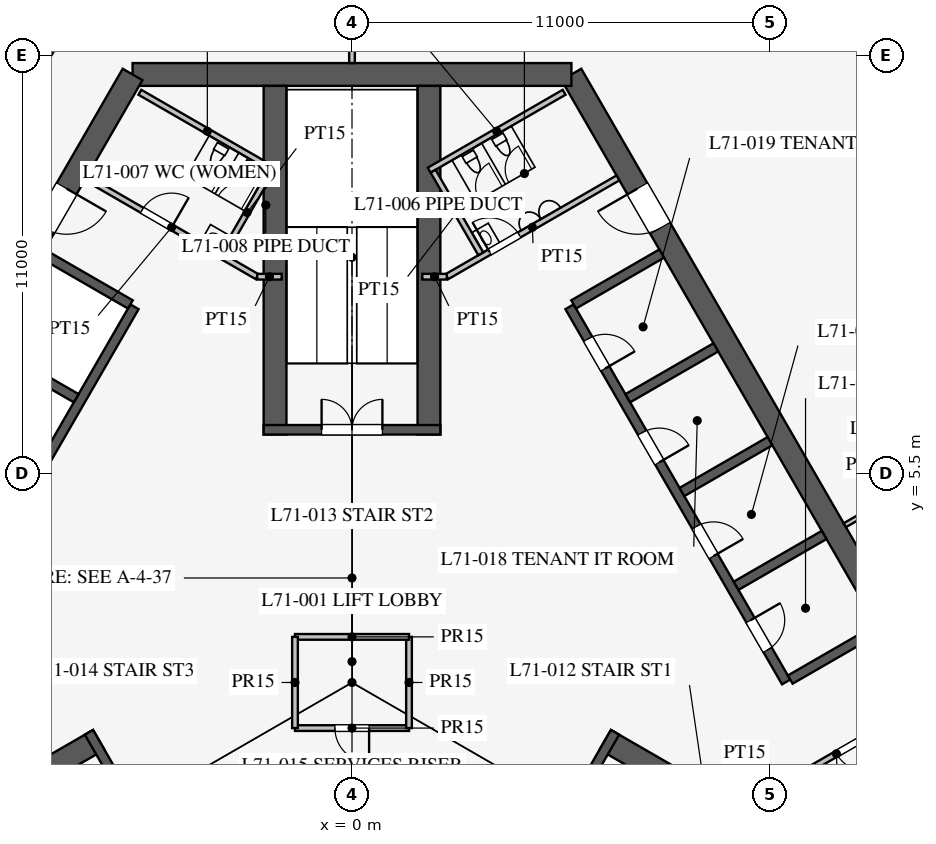
"""IFC4 building model, lengths in metres.
Left out: names, types, materials, properties, quantities, classifications, styles, units other than length and angle.
Written with IfcOpenShell. Run it as: python <this file> out.ifc"""

import sys

from ifc_helpers import new_model, si_unit, direction, frame, frame_2d, origin, place, context, subcontext, project, spatial, rectangle, extrude, element, fill, save


model = new_model("IFC4")
c1 = context("Model", 3, precision=1e-05, world=origin(), true_north=direction((0.0, 1.0)))
c2 = subcontext(c1, "Body", "Model", "MODEL_VIEW")
j1 = project(units=[si_unit("LENGTHUNIT", "METRE"), si_unit("PLANEANGLEUNIT", "RADIAN")], contexts=[c1])
p1 = place(None, origin())
s1 = spatial("IfcSite", under=j1, at=p1, CompositionType="ELEMENT")
p2 = place(p1, origin())
s2 = spatial("IfcBuilding", under=s1, at=p2, CompositionType="ELEMENT")
p3 = place(p2, frame((0.0, 0.0, 309.9)))
s3 = spatial("IfcBuildingStorey", under=s2, at=p3, CompositionType="ELEMENT", Elevation=309.9)
p4 = place(p3, frame((16.743, -3.0, 0.0), z_axis=(0.0, 0.0, 1.0), x_axis=(-0.500002442456, 0.866023993627, 0.0)))
e1 = element("IfcWall", 1, at=p4, inside=s3, PredefinedType="SHEAR", context=c2, shape_type="SweptSolid", body=[
    extrude(rectangle(XDim=21.939, YDim=0.6, at=frame_2d((10.97, 0.0))), origin(), (0.0, 0.0, 1.0), 4.2),
])
p5 = place(p4, frame((17.27, 0.0, 0.0)))
e2 = element("IfcOpeningElement", 2, at=p5, cuts=e1, PredefinedType="OPENING", context=c2, shape_type="SweptSolid", body=[
    extrude(rectangle(XDim=1.2, YDim=2.1, at=frame_2d((0.6, 1.05))), frame((0.0, 0.31, 0.0), z_axis=(0.0, -1.0, 0.0), x_axis=(1.0, 0.0, 0.0)), (0.0, 0.0, 1.0), 0.62),
])
p6 = place(p4, frame((3.47, 0.0, 0.0)))
e3 = element("IfcOpeningElement", 3, at=p6, cuts=e1, PredefinedType="OPENING", context=c2, shape_type="SweptSolid", body=[
    extrude(rectangle(XDim=1.2, YDim=2.1, at=frame_2d((0.6, 1.05))), frame((0.0, 0.31, 0.0), z_axis=(0.0, -1.0, 0.0), x_axis=(1.0, 0.0, 0.0)), (0.0, 0.0, 1.0), 0.62),
])
p7 = place(p3, frame((5.773, 16.0, 0.0), z_axis=(0.0, 0.0, 1.0), x_axis=(-1.0, 0.0, 0.0)))
e4 = element("IfcWall", 4, at=p7, inside=s3, PredefinedType="SHEAR", context=c2, shape_type="SweptSolid", body=[
    extrude(rectangle(XDim=11.547, YDim=0.6, at=frame_2d((5.773, 0.0))), origin(), (0.0, 0.0, 1.0), 4.2),
])
p8 = place(p3, frame((-5.773, 16.0, 0.0), z_axis=(0.0, 0.0, 1.0), x_axis=(-0.500002442456, -0.866023993627, 0.0)))
e5 = element("IfcWall", 5, at=p8, inside=s3, PredefinedType="SHEAR", context=c2, shape_type="SweptSolid", body=[
    extrude(rectangle(XDim=21.939, YDim=0.6, at=frame_2d((10.97, 0.0))), origin(), (0.0, 0.0, 1.0), 4.2),
])
p9 = place(p8, frame((17.27, 0.0, 0.0)))
e6 = element("IfcOpeningElement", 6, at=p9, cuts=e5, PredefinedType="OPENING", context=c2, shape_type="SweptSolid", body=[
    extrude(rectangle(XDim=1.2, YDim=2.1, at=frame_2d((0.6, 1.05))), frame((0.0, 0.31, 0.0), z_axis=(0.0, -1.0, 0.0), x_axis=(1.0, 0.0, 0.0)), (0.0, 0.0, 1.0), 0.62),
])
p10 = place(p8, frame((3.47, 0.0, 0.0)))
e7 = element("IfcOpeningElement", 7, at=p10, cuts=e5, PredefinedType="OPENING", context=c2, shape_type="SweptSolid", body=[
    extrude(rectangle(XDim=1.2, YDim=2.1, at=frame_2d((0.6, 1.05))), frame((0.0, 0.31, 0.0), z_axis=(0.0, -1.0, 0.0), x_axis=(1.0, 0.0, 0.0)), (0.0, 0.0, 1.0), 0.62),
])
p11 = place(p3, frame((11.424, 0.014, 0.0), z_axis=(0.0, 0.0, 1.0), x_axis=(-0.500001763848, 0.866024385424, 0.0)))
e8 = element("IfcWall", 8, at=p11, inside=s3, PredefinedType="SHEAR", context=c2, shape_type="SweptSolid", body=[
    extrude(rectangle(XDim=11.4, YDim=0.25, at=frame_2d((5.7, 0.0))), origin(), (0.0, 0.0, 1.0), 4.2),
])
p12 = place(p11, frame((0.975, 0.0, 0.0)))
e9 = element("IfcOpeningElement", 9, at=p12, cuts=e8, PredefinedType="OPENING", context=c2, shape_type="SweptSolid", body=[
    extrude(rectangle(XDim=0.9, YDim=2.1, at=frame_2d((0.45, 1.05))), frame((0.0, 0.135, 0.0), z_axis=(0.0, -1.0, 0.0), x_axis=(1.0, 0.0, 0.0)), (0.0, 0.0, 1.0), 0.27),
])
p13 = place(p11, frame((3.825, 0.0, 0.0)))
e10 = element("IfcOpeningElement", 10, at=p13, cuts=e8, PredefinedType="OPENING", context=c2, shape_type="SweptSolid", body=[
    extrude(rectangle(XDim=0.9, YDim=2.1, at=frame_2d((0.45, 1.05))), frame((0.0, 0.135, 0.0), z_axis=(0.0, -1.0, 0.0), x_axis=(1.0, 0.0, 0.0)), (0.0, 0.0, 1.0), 0.27),
])
p14 = place(p11, frame((6.675, 0.0, 0.0)))
e11 = element("IfcOpeningElement", 11, at=p14, cuts=e8, PredefinedType="OPENING", context=c2, shape_type="SweptSolid", body=[
    extrude(rectangle(XDim=0.9, YDim=2.1, at=frame_2d((0.45, 1.05))), frame((0.0, 0.135, 0.0), z_axis=(0.0, -1.0, 0.0), x_axis=(1.0, 0.0, 0.0)), (0.0, 0.0, 1.0), 0.27),
])
p15 = place(p11, frame((9.525, 0.0, 0.0)))
e12 = element("IfcOpeningElement", 12, at=p15, cuts=e8, PredefinedType="OPENING", context=c2, shape_type="SweptSolid", body=[
    extrude(rectangle(XDim=0.9, YDim=2.1, at=frame_2d((0.45, 1.05))), frame((0.0, 0.135, 0.0), z_axis=(0.0, -1.0, 0.0), x_axis=(1.0, 0.0, 0.0)), (0.0, 0.0, 1.0), 0.27),
])
for number, where, z_axis, x_axis in (
    (13, (11.532, 0.076, 0.0), (0.0, 0.0, 1.0), (0.866, 0.5, 0.0)),
    (14, (10.107, 2.544, 0.0), (0.0, 0.0, 1.0), (0.866, 0.5, 0.0)),
    (15, (8.682, 5.012, 0.0), (0.0, 0.0, 1.0), (0.866, 0.5, 0.0)),
    (16, (7.257, 7.481, 0.0), (0.0, 0.0, 1.0), (0.866, 0.5, 0.0)),
    (17, (5.832, 9.949, 0.0), (0.0, 0.0, 1.0), (0.866, 0.5, 0.0)),
):
    element("IfcWall", number, at=place(p3, frame(where, z_axis=z_axis, x_axis=x_axis)), inside=s3, PredefinedType="SHEAR", context=c2, shape_type="SweptSolid", body=[
        extrude(rectangle(XDim=2.675, YDim=0.25, at=frame_2d((1.337, 0.0))), origin(), (0.0, 0.0, 1.0), 4.2),
    ])
p16 = place(p3, frame((-5.724, 9.886, 0.0), z_axis=(0.0, 0.0, 1.0), x_axis=(-0.500001763848, -0.866024385424, 0.0)))
e18 = element("IfcWall", 18, at=p16, inside=s3, PredefinedType="SHEAR", context=c2, shape_type="SweptSolid", body=[
    extrude(rectangle(XDim=11.4, YDim=0.25, at=frame_2d((5.7, 0.0))), origin(), (0.0, 0.0, 1.0), 4.2),
])
p17 = place(p16, frame((6.525, 0.0, 0.0)))
e19 = element("IfcOpeningElement", 19, at=p17, cuts=e18, PredefinedType="OPENING", context=c2, shape_type="SweptSolid", body=[
    extrude(rectangle(XDim=1.2, YDim=2.2, at=frame_2d((0.6, 1.1))), frame((0.0, 0.135, 0.0), z_axis=(0.0, -1.0, 0.0), x_axis=(1.0, 0.0, 0.0)), (0.0, 0.0, 1.0), 0.27),
])
p18 = place(p16, frame((9.375, 0.0, 0.0)))
e20 = element("IfcOpeningElement", 20, at=p18, cuts=e18, PredefinedType="OPENING", context=c2, shape_type="SweptSolid", body=[
    extrude(rectangle(XDim=1.2, YDim=2.2, at=frame_2d((0.6, 1.1))), frame((0.0, 0.135, 0.0), z_axis=(0.0, -1.0, 0.0), x_axis=(1.0, 0.0, 0.0)), (0.0, 0.0, 1.0), 0.27),
])
for number, where, z_axis, x_axis in (
    (21, (-5.832, 9.949, 0.0), (0.0, 0.0, 1.0), (-0.866, 0.5, 0.0)),
    (22, (-7.257, 7.481, 0.0), (0.0, 0.0, 1.0), (-0.866, 0.5, 0.0)),
):
    element("IfcWall", number, at=place(p3, frame(where, z_axis=z_axis, x_axis=x_axis)), inside=s3, PredefinedType="SHEAR", context=c2, shape_type="SweptSolid", body=[
        extrude(rectangle(XDim=2.675, YDim=0.25, at=frame_2d((1.337, 0.0))), origin(), (0.0, 0.0, 1.0), 4.2),
    ])
p19 = place(p3, frame((6.663, -1.509, 0.0), z_axis=(0.0, 0.0, 1.0), x_axis=(0.86603049496, -0.499991181721, 0.0)))
e23 = element("IfcWall", 23, at=p19, inside=s3, PredefinedType="SHEAR", context=c2, shape_type="SweptSolid", body=[
    extrude(rectangle(XDim=9.175, YDim=0.6, at=frame_2d((4.587, 0.0))), origin(), (0.0, 0.0, 1.0), 4.2),
])
p20 = place(p3, frame((4.597, -5.339, 0.0), z_axis=(0.0, 0.0, 1.0), x_axis=(0.499984536904, 0.866034331223, 0.0)))
e24 = element("IfcWall", 24, at=p20, inside=s3, PredefinedType="SHEAR", context=c2, shape_type="SweptSolid", body=[
    extrude(rectangle(XDim=4.65, YDim=0.25, at=frame_2d((2.325, 0.0))), origin(), (0.0, 0.0, 1.0), 4.2),
])
p21 = place(p20, frame((1.525, 0.0, 0.0)))
e25 = element("IfcOpeningElement", 25, at=p21, cuts=e24, PredefinedType="OPENING", context=c2, shape_type="SweptSolid", body=[
    extrude(rectangle(XDim=1.6, YDim=2.1, at=frame_2d((0.8, 1.05))), frame((0.0, 0.135, 0.0), z_axis=(0.0, -1.0, 0.0), x_axis=(1.0, 0.0, 0.0)), (0.0, 0.0, 1.0), 0.27),
])
for number, where, z_axis, x_axis in (
    (26, (2.025, 6.525, 0.0), (0.0, 0.0, 1.0), (0.0, 1.0, 0.0)),
    (27, (-2.025, 6.525, 0.0), (0.0, 0.0, 1.0), (0.0, 1.0, 0.0)),
):
    element("IfcWall", number, at=place(p3, frame(where, z_axis=z_axis, x_axis=x_axis)), inside=s3, PredefinedType="SHEAR", context=c2, shape_type="SweptSolid", body=[
        extrude(rectangle(XDim=9.175, YDim=0.6, at=frame_2d((4.587, 0.0))), origin(), (0.0, 0.0, 1.0), 4.2),
    ])
p22 = place(p3, frame((2.325, 6.65, 0.0), z_axis=(0.0, 0.0, 1.0), x_axis=(-1.0, 0.0, 0.0)))
e28 = element("IfcWall", 28, at=p22, inside=s3, PredefinedType="SHEAR", context=c2, shape_type="SweptSolid", body=[
    extrude(rectangle(XDim=4.65, YDim=0.25, at=frame_2d((2.325, 0.0))), origin(), (0.0, 0.0, 1.0), 4.2),
])
p23 = place(p22, frame((1.525, 0.0, 0.0)))
e29 = element("IfcOpeningElement", 29, at=p23, cuts=e28, PredefinedType="OPENING", context=c2, shape_type="SweptSolid", body=[
    extrude(rectangle(XDim=1.6, YDim=2.1, at=frame_2d((0.8, 1.05))), frame((0.0, 0.135, 0.0), z_axis=(0.0, -1.0, 0.0), x_axis=(1.0, 0.0, 0.0)), (0.0, 0.0, 1.0), 0.27),
])
p24 = place(p3, frame((-6.663, -1.509, 0.0), z_axis=(0.0, 0.0, 1.0), x_axis=(-0.86603049496, -0.499991181721, 0.0)))
e30 = element("IfcWall", 30, at=p24, inside=s3, PredefinedType="SHEAR", context=c2, shape_type="SweptSolid", body=[
    extrude(rectangle(XDim=9.175, YDim=0.6, at=frame_2d((4.587, 0.0))), origin(), (0.0, 0.0, 1.0), 4.2),
])
p25 = place(p3, frame((-6.922, -1.312, 0.0), z_axis=(0.0, 0.0, 1.0), x_axis=(0.499984536904, -0.866034331223, 0.0)))
e31 = element("IfcWall", 31, at=p25, inside=s3, PredefinedType="SHEAR", context=c2, shape_type="SweptSolid", body=[
    extrude(rectangle(XDim=4.65, YDim=0.25, at=frame_2d((2.325, 0.0))), origin(), (0.0, 0.0, 1.0), 4.2),
])
p26 = place(p25, frame((1.525, 0.0, 0.0)))
e32 = element("IfcOpeningElement", 32, at=p26, cuts=e31, PredefinedType="OPENING", context=c2, shape_type="SweptSolid", body=[
    extrude(rectangle(XDim=1.6, YDim=2.1, at=frame_2d((0.8, 1.05))), frame((0.0, 0.135, 0.0), z_axis=(0.0, -1.0, 0.0), x_axis=(1.0, 0.0, 0.0)), (0.0, 0.0, 1.0), 0.27),
])
p27 = place(p3, frame((2.495, 10.678, 0.0), z_axis=(0.0, 0.0, 1.0), x_axis=(0.866021400173, 0.500006934395, 0.0)))
e33 = element("IfcWall", 33, at=p27, inside=s3, PredefinedType="PARTITIONING", context=c2, shape_type="SweptSolid", body=[
    extrude(rectangle(XDim=5.2, YDim=0.15, at=frame_2d((2.6, 0.0))), origin(), (0.0, 0.0, 1.0), 4.0),
])
p28 = place(p27, frame((1.3, 0.0, 0.0)))
e34 = element("IfcOpeningElement", 34, at=p28, cuts=e33, PredefinedType="OPENING", context=c2, shape_type="SweptSolid", body=[
    extrude(rectangle(XDim=0.9, YDim=2.1, at=frame_2d((0.45, 1.05))), frame((0.0, 0.085, 0.0), z_axis=(0.0, -1.0, 0.0), x_axis=(1.0, 0.0, 0.0)), (0.0, 0.0, 1.0), 0.17),
])
p29 = place(p3, frame((10.495, -3.178, 0.0), z_axis=(0.0, 0.0, 1.0), x_axis=(0.866021400173, 0.500006934395, 0.0)))
e35 = element("IfcWall", 35, at=p29, inside=s3, PredefinedType="PARTITIONING", context=c2, shape_type="SweptSolid", body=[
    extrude(rectangle(XDim=5.2, YDim=0.15, at=frame_2d((2.6, 0.0))), origin(), (0.0, 0.0, 1.0), 4.0),
])
p30 = place(p29, frame((2.6, 0.0, 0.0)))
e36 = element("IfcOpeningElement", 36, at=p30, cuts=e35, PredefinedType="OPENING", context=c2, shape_type="SweptSolid", body=[
    extrude(rectangle(XDim=0.9, YDim=2.1, at=frame_2d((0.45, 1.05))), frame((0.0, 0.085, 0.0), z_axis=(0.0, -1.0, 0.0), x_axis=(1.0, 0.0, 0.0)), (0.0, 0.0, 1.0), 0.17),
])
p31 = place(p3, frame((-2.495, 10.678, 0.0), z_axis=(0.0, 0.0, 1.0), x_axis=(-0.866021400173, 0.500006934395, 0.0)))
e37 = element("IfcWall", 37, at=p31, inside=s3, PredefinedType="PARTITIONING", context=c2, shape_type="SweptSolid", body=[
    extrude(rectangle(XDim=5.2, YDim=0.15, at=frame_2d((2.6, 0.0))), origin(), (0.0, 0.0, 1.0), 4.0),
])
p32 = place(p31, frame((2.6, 0.0, 0.0)))
e38 = element("IfcOpeningElement", 38, at=p32, cuts=e37, PredefinedType="OPENING", context=c2, shape_type="SweptSolid", body=[
    extrude(rectangle(XDim=0.9, YDim=2.1, at=frame_2d((0.45, 1.05))), frame((0.0, 0.085, 0.0), z_axis=(0.0, -1.0, 0.0), x_axis=(1.0, 0.0, 0.0)), (0.0, 0.0, 1.0), 0.17),
])
for number, where, z_axis, x_axis in (
    (39, (2.495, 10.678, 0.0), (0.0, 0.0, 1.0), (-1.0, 0.0, 0.0)),
    (40, (-2.495, 10.678, 0.0), (0.0, 0.0, 1.0), (1.0, 0.0, 0.0)),
):
    element("IfcWall", number, at=place(p3, frame(where, z_axis=z_axis, x_axis=x_axis)), inside=s3, PredefinedType="PARTITIONING", context=c2, shape_type="SweptSolid", body=[
        extrude(rectangle(XDim=0.645, YDim=0.15, at=frame_2d((0.323, 0.0))), origin(), (0.0, 0.0, 1.0), 4.0),
    ])
p33 = place(p3, frame((2.031, 13.482, 0.0), z_axis=(0.0, 0.0, 1.0), x_axis=(0.866050731258, 0.499956128963, 0.0)))
e41 = element("IfcWall", 41, at=p33, inside=s3, PredefinedType="PARTITIONING", context=c2, shape_type="SweptSolid", body=[
    extrude(rectangle(XDim=4.1, YDim=0.15, at=frame_2d((2.05, 0.0))), origin(), (0.0, 0.0, 1.0), 4.0),
])
p34 = place(p3, frame((3.389, 11.281, 0.0), z_axis=(0.0, 0.0, 1.0), x_axis=(-0.499989096993, 0.866031698547, 0.0)))
e42 = element("IfcWall", 42, at=p34, inside=s3, PredefinedType="PARTITIONING", context=c2, shape_type="SweptSolid", body=[
    extrude(rectangle(XDim=2.51, YDim=0.15, at=frame_2d((1.255, 0.0))), origin(), (0.0, 0.0, 1.0), 4.0),
])
p35 = place(p3, frame((-2.031, 13.482, 0.0), z_axis=(0.0, 0.0, 1.0), x_axis=(-0.866050731258, 0.499956128963, 0.0)))
e43 = element("IfcWall", 43, at=p35, inside=s3, PredefinedType="PARTITIONING", context=c2, shape_type="SweptSolid", body=[
    extrude(rectangle(XDim=4.1, YDim=0.15, at=frame_2d((2.05, 0.0))), origin(), (0.0, 0.0, 1.0), 4.0),
])
p36 = place(p3, frame((-3.389, 11.281, 0.0), z_axis=(0.0, 0.0, 1.0), x_axis=(0.499989096993, 0.866031698547, 0.0)))
e44 = element("IfcWall", 44, at=p36, inside=s3, PredefinedType="PARTITIONING", context=c2, shape_type="SweptSolid", body=[
    extrude(rectangle(XDim=2.51, YDim=0.15, at=frame_2d((1.255, 0.0))), origin(), (0.0, 0.0, 1.0), 4.0),
])
p37 = place(p3, frame((-1.5, -1.2, 0.0), z_axis=(0.0, 0.0, 1.0), x_axis=(1.0, 0.0, 0.0)))
e45 = element("IfcWall", 45, at=p37, inside=s3, PredefinedType="PARTITIONING", context=c2, shape_type="SweptSolid", body=[
    extrude(rectangle(XDim=3.0, YDim=0.15, at=frame_2d((1.5, 0.0))), origin(), (0.0, 0.0, 1.0), 4.0),
])
p38 = place(p37, frame((1.05, 0.0, 0.0)))
e46 = element("IfcOpeningElement", 46, at=p38, cuts=e45, PredefinedType="OPENING", context=c2, shape_type="SweptSolid", body=[
    extrude(rectangle(XDim=0.9, YDim=2.1, at=frame_2d((0.45, 1.05))), frame((0.0, 0.085, 0.0), z_axis=(0.0, -1.0, 0.0), x_axis=(1.0, 0.0, 0.0)), (0.0, 0.0, 1.0), 0.17),
])
p39 = place(p3, frame((1.5, -1.2, 0.0), z_axis=(0.0, 0.0, 1.0), x_axis=(0.0, 1.0, 0.0)))
e47 = element("IfcWall", 47, at=p39, inside=s3, PredefinedType="PARTITIONING", context=c2, shape_type="SweptSolid", body=[
    extrude(rectangle(XDim=2.4, YDim=0.15, at=frame_2d((1.2, 0.0))), origin(), (0.0, 0.0, 1.0), 4.0),
])
p40 = place(p3, frame((1.5, 1.2, 0.0), z_axis=(0.0, 0.0, 1.0), x_axis=(-1.0, 0.0, 0.0)))
e48 = element("IfcWall", 48, at=p40, inside=s3, PredefinedType="PARTITIONING", context=c2, shape_type="SweptSolid", body=[
    extrude(rectangle(XDim=3.0, YDim=0.15, at=frame_2d((1.5, 0.0))), origin(), (0.0, 0.0, 1.0), 4.0),
])
p41 = place(p3, frame((-1.5, 1.2, 0.0), z_axis=(0.0, 0.0, 1.0), x_axis=(0.0, -1.0, 0.0)))
e49 = element("IfcWall", 49, at=p41, inside=s3, PredefinedType="PARTITIONING", context=c2, shape_type="SweptSolid", body=[
    extrude(rectangle(XDim=2.4, YDim=0.15, at=frame_2d((1.2, 0.0))), origin(), (0.0, 0.0, 1.0), 4.0),
])
p42 = place(p3, frame((0.0, 16.3, 0.0), z_axis=(0.0, 0.0, 1.0), x_axis=(0.0, 1.0, 0.0)))
e50 = element("IfcWall", 50, at=p42, inside=s3, PredefinedType="PARTITIONING", context=c2, shape_type="SweptSolid", body=[
    extrude(rectangle(XDim=13.45, YDim=0.15, at=frame_2d((6.725, 0.0))), origin(), (0.0, 0.0, 1.0), 2.5),
])
p43 = place(p3, frame((12.968, 4.138, 0.0), z_axis=(0.0, 0.0, 1.0), x_axis=(0.866028054938, 0.499995408039, 0.0)))
e51 = element("IfcWall", 51, at=p43, inside=s3, PredefinedType="PARTITIONING", context=c2, shape_type="SweptSolid", body=[
    extrude(rectangle(XDim=3.2, YDim=0.12, at=frame_2d((1.6, 0.0))), origin(), (0.0, 0.0, 1.0), 2.9),
])
p44 = place(p3, frame((-0.29, 29.818, 0.0), z_axis=(0.0, 0.0, 1.0), x_axis=(-0.500000361757, -0.866025194924, 0.0)))
e52 = element("IfcWall", 52, at=p44, inside=s3, PredefinedType="PARTITIONING", context=c2, shape_type="SweptSolid", body=[
    extrude(rectangle(XDim=51.355, YDim=0.12, at=frame_2d((25.678, 0.0))), origin(), (0.0, 0.0, 1.0), 2.9),
])
p45 = place(p44, frame((9.9, 0.0, 0.15)))
e53 = element("IfcOpeningElement", 53, at=p45, cuts=e52, PredefinedType="OPENING", context=c2, shape_type="SweptSolid", body=[
    extrude(rectangle(XDim=1.8, YDim=2.1, at=frame_2d((0.9, 1.05))), frame((0.0, 0.07, 0.0), z_axis=(0.0, -1.0, 0.0), x_axis=(1.0, 0.0, 0.0)), (0.0, 0.0, 1.0), 0.14),
])
p46 = place(p44, frame((39.65, 0.0, 0.15)))
e54 = element("IfcOpeningElement", 54, at=p46, cuts=e52, PredefinedType="OPENING", context=c2, shape_type="SweptSolid", body=[
    extrude(rectangle(XDim=1.8, YDim=2.1, at=frame_2d((0.9, 1.05))), frame((0.0, 0.07, 0.0), z_axis=(0.0, -1.0, 0.0), x_axis=(1.0, 0.0, 0.0)), (0.0, 0.0, 1.0), 0.14),
])
p47 = place(p28, origin())
e55 = element("IfcDoor", 55, at=p47, inside=s3, OperationType="SINGLE_SWING_LEFT", PredefinedType="DOOR", context=c2, shape_type="SweptSolid", body=[
    extrude(rectangle(XDim=0.9, YDim=2.1, at=frame_2d((0.45, 1.05))), frame((0.0, 0.025, 0.0), z_axis=(0.0, -1.0, 0.0), x_axis=(1.0, 0.0, 0.0)), (0.0, 0.0, 1.0), 0.05),
])
fill(e34, e55)
p48 = place(p30, frame((0.9, 0.0, 0.0), z_axis=(0.0, 0.0, 1.0), x_axis=(-1.0, 0.0, 0.0)))
e56 = element("IfcDoor", 56, at=p48, inside=s3, OperationType="SINGLE_SWING_LEFT", PredefinedType="DOOR", context=c2, shape_type="SweptSolid", body=[
    extrude(rectangle(XDim=0.9, YDim=2.1, at=frame_2d((0.45, 1.05))), frame((0.0, 0.025, 0.0), z_axis=(0.0, -1.0, 0.0), x_axis=(1.0, 0.0, 0.0)), (0.0, 0.0, 1.0), 0.05),
])
fill(e36, e56)
p49 = place(p32, frame((0.9, 0.0, 0.0), z_axis=(0.0, 0.0, 1.0), x_axis=(-1.0, 0.0, 0.0)))
e57 = element("IfcDoor", 57, at=p49, inside=s3, OperationType="SINGLE_SWING_RIGHT", PredefinedType="DOOR", context=c2, shape_type="SweptSolid", body=[
    extrude(rectangle(XDim=0.9, YDim=2.1, at=frame_2d((0.45, 1.05))), frame((0.0, 0.025, 0.0), z_axis=(0.0, -1.0, 0.0), x_axis=(1.0, 0.0, 0.0)), (0.0, 0.0, 1.0), 0.05),
])
fill(e38, e57)
p50 = place(p38, frame((0.9, 0.0, 0.0), z_axis=(0.0, 0.0, 1.0), x_axis=(-1.0, 0.0, 0.0)))
e58 = element("IfcDoor", 58, at=p50, inside=s3, OperationType="SINGLE_SWING_LEFT", PredefinedType="DOOR", context=c2, shape_type="SweptSolid", body=[
    extrude(rectangle(XDim=0.9, YDim=2.1, at=frame_2d((0.45, 1.05))), frame((0.0, 0.025, 0.0), z_axis=(0.0, -1.0, 0.0), x_axis=(1.0, 0.0, 0.0)), (0.0, 0.0, 1.0), 0.05),
])
fill(e46, e58)
p51 = place(p23, frame((1.6, 0.0, 0.0), z_axis=(0.0, 0.0, 1.0), x_axis=(-1.0, 0.0, 0.0)))
e59 = element("IfcDoor", 59, at=p51, inside=s3, OperationType="DOUBLE_DOOR_SINGLE_SWING", PredefinedType="DOOR", context=c2, shape_type="SweptSolid", body=[
    extrude(rectangle(XDim=1.6, YDim=2.1, at=frame_2d((0.8, 1.05))), frame((0.0, 0.025, 0.0), z_axis=(0.0, -1.0, 0.0), x_axis=(1.0, 0.0, 0.0)), (0.0, 0.0, 1.0), 0.05),
])
fill(e29, e59)
p52 = place(p5, origin())
e60 = element("IfcDoor", 60, at=p52, inside=s3, OperationType="SINGLE_SWING_RIGHT", PredefinedType="DOOR", context=c2, shape_type="SweptSolid", body=[
    extrude(rectangle(XDim=1.2, YDim=2.1, at=frame_2d((0.6, 1.05))), frame((0.0, 0.025, 0.0), z_axis=(0.0, -1.0, 0.0), x_axis=(1.0, 0.0, 0.0)), (0.0, 0.0, 1.0), 0.05),
])
fill(e2, e60)
p53 = place(p10, origin())
e61 = element("IfcDoor", 61, at=p53, inside=s3, OperationType="SINGLE_SWING_LEFT", PredefinedType="DOOR", context=c2, shape_type="SweptSolid", body=[
    extrude(rectangle(XDim=1.2, YDim=2.1, at=frame_2d((0.6, 1.05))), frame((0.0, 0.025, 0.0), z_axis=(0.0, -1.0, 0.0), x_axis=(1.0, 0.0, 0.0)), (0.0, 0.0, 1.0), 0.05),
])
fill(e7, e61)
p54 = place(p12, frame((0.9, 0.0, 0.0), z_axis=(0.0, 0.0, 1.0), x_axis=(-1.0, 0.0, 0.0)))
e62 = element("IfcDoor", 62, at=p54, inside=s3, OperationType="SINGLE_SWING_LEFT", PredefinedType="DOOR", context=c2, shape_type="SweptSolid", body=[
    extrude(rectangle(XDim=0.9, YDim=2.1, at=frame_2d((0.45, 1.05))), frame((0.0, 0.025, 0.0), z_axis=(0.0, -1.0, 0.0), x_axis=(1.0, 0.0, 0.0)), (0.0, 0.0, 1.0), 0.05),
])
fill(e9, e62)
p55 = place(p13, frame((0.9, 0.0, 0.0), z_axis=(0.0, 0.0, 1.0), x_axis=(-1.0, 0.0, 0.0)))
e63 = element("IfcDoor", 63, at=p55, inside=s3, OperationType="SINGLE_SWING_RIGHT", PredefinedType="DOOR", context=c2, shape_type="SweptSolid", body=[
    extrude(rectangle(XDim=0.9, YDim=2.1, at=frame_2d((0.45, 1.05))), frame((0.0, 0.025, 0.0), z_axis=(0.0, -1.0, 0.0), x_axis=(1.0, 0.0, 0.0)), (0.0, 0.0, 1.0), 0.05),
])
fill(e10, e63)
p56 = place(p14, frame((0.9, 0.0, 0.0), z_axis=(0.0, 0.0, 1.0), x_axis=(-1.0, 0.0, 0.0)))
e64 = element("IfcDoor", 64, at=p56, inside=s3, OperationType="SINGLE_SWING_RIGHT", PredefinedType="DOOR", context=c2, shape_type="SweptSolid", body=[
    extrude(rectangle(XDim=0.9, YDim=2.1, at=frame_2d((0.45, 1.05))), frame((0.0, 0.025, 0.0), z_axis=(0.0, -1.0, 0.0), x_axis=(1.0, 0.0, 0.0)), (0.0, 0.0, 1.0), 0.05),
])
fill(e11, e64)
p57 = place(p15, frame((0.9, 0.0, 0.0), z_axis=(0.0, 0.0, 1.0), x_axis=(-1.0, 0.0, 0.0)))
e65 = element("IfcDoor", 65, at=p57, inside=s3, OperationType="SINGLE_SWING_RIGHT", PredefinedType="DOOR", context=c2, shape_type="SweptSolid", body=[
    extrude(rectangle(XDim=0.9, YDim=2.1, at=frame_2d((0.45, 1.05))), frame((0.0, 0.025, 0.0), z_axis=(0.0, -1.0, 0.0), x_axis=(1.0, 0.0, 0.0)), (0.0, 0.0, 1.0), 0.05),
])
fill(e12, e65)
save(model, sys.argv[1])
